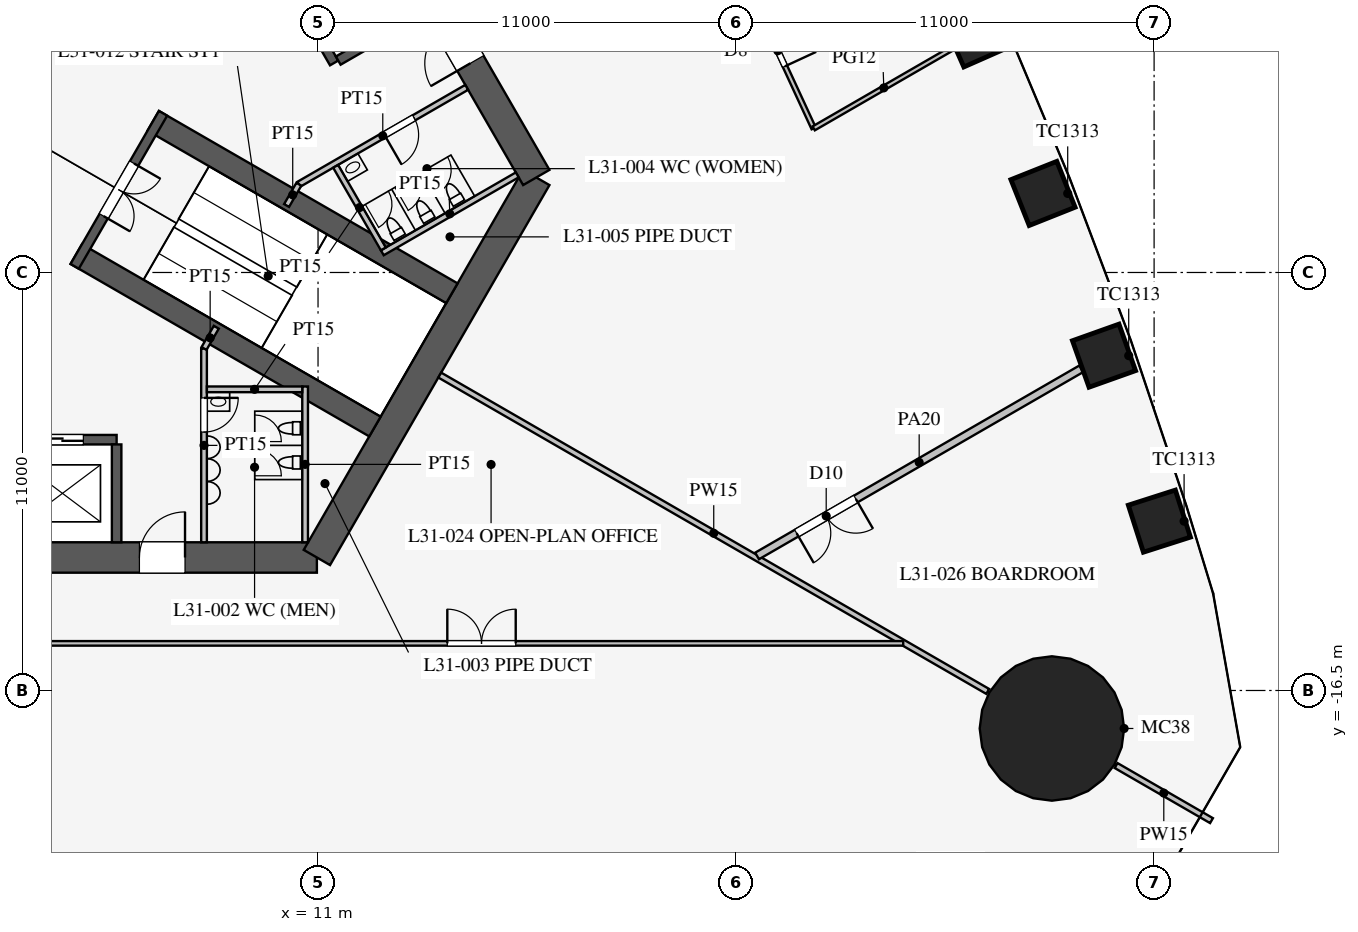
"""IFC4 building model, lengths in metres.
Left out: names, types, materials, properties, quantities, classifications, styles, units other than length and angle.
Written with IfcOpenShell. Run it as: python <this file> out.ifc"""

import sys

from ifc_helpers import new_model, si_unit, direction, frame, frame_2d, origin, origin_2d, place, context, subcontext, project, spatial, rectangle, circle, extrude, element, fill, save


model = new_model("IFC4")
c1 = context("Model", 3, precision=1e-05, world=origin(), true_north=direction((0.0, 1.0)))
c2 = subcontext(c1, "Body", "Model", "MODEL_VIEW")
j1 = project(units=[si_unit("LENGTHUNIT", "METRE"), si_unit("PLANEANGLEUNIT", "RADIAN")], contexts=[c1])
p1 = place(None, origin())
s1 = spatial("IfcSite", under=j1, at=p1, CompositionType="ELEMENT")
p2 = place(p1, origin())
s2 = spatial("IfcBuilding", under=s1, at=p2, CompositionType="ELEMENT")
p3 = place(p2, frame((0.0, 0.0, 136.7)))
s3 = spatial("IfcBuildingStorey", under=s2, at=p3, CompositionType="ELEMENT", Elevation=136.7)
for number, where, z_axis, x_axis in (
    (1, (33.139, -12.044, 0.0), (0.0, 0.0, 1.0), (-0.305, 0.952, 0.0)),
    (2, (31.682, -7.689, 0.0), (0.0, 0.0, 1.0), (-0.336, 0.942, 0.0)),
    (3, (30.077, -3.42, 0.0), (0.0, 0.0, 1.0), (-0.37, 0.929, 0.0)),
    (4, (28.325, 0.765, 0.0), (0.0, 0.0, 1.0), (-0.403, 0.915, 0.0)),
):
    element("IfcColumn", number, at=place(p3, frame(where, z_axis=z_axis, x_axis=x_axis)), inside=s3, PredefinedType="COLUMN", context=c2, shape_type="SweptSolid", body=[
        extrude(rectangle(XDim=1.3, YDim=1.3, at=origin_2d()), origin(), (0.0, 0.0, 1.0), 4.2),
    ])
p4 = place(p3, frame((30.311, -17.5, 0.0), z_axis=(0.0, 0.0, 1.0), x_axis=(1.0, 0.0, 0.0)))
e5 = element("IfcColumn", 5, at=p4, inside=s3, PredefinedType="COLUMN", context=c2, shape_type="SweptSolid", body=[
    extrude(circle(Radius=1.9, at=origin_2d()), origin(), (0.0, 0.0, 1.0), 4.2),
])
p5 = place(p3, frame((-10.97, -13.0, 0.0), z_axis=(0.0, 0.0, 1.0), x_axis=(1.0, 0.0, 0.0)))
e6 = element("IfcWall", 6, at=p5, inside=s3, PredefinedType="SHEAR", context=c2, shape_type="SweptSolid", body=[
    extrude(rectangle(XDim=21.939, YDim=0.8, at=frame_2d((10.97, 0.0))), origin(), (0.0, 0.0, 1.0), 4.2),
])
p6 = place(p5, frame((17.27, 0.0, 0.0)))
e7 = element("IfcOpeningElement", 7, at=p6, cuts=e6, PredefinedType="OPENING", context=c2, shape_type="SweptSolid", body=[
    extrude(rectangle(XDim=1.2, YDim=2.1, at=frame_2d((0.6, 1.05))), frame((0.0, 0.41, 0.0), z_axis=(0.0, -1.0, 0.0), x_axis=(1.0, 0.0, 0.0)), (0.0, 0.0, 1.0), 0.82),
])
p7 = place(p5, frame((3.47, 0.0, 0.0)))
e8 = element("IfcOpeningElement", 8, at=p7, cuts=e6, PredefinedType="OPENING", context=c2, shape_type="SweptSolid", body=[
    extrude(rectangle(XDim=1.2, YDim=2.1, at=frame_2d((0.6, 1.05))), frame((0.0, 0.41, 0.0), z_axis=(0.0, -1.0, 0.0), x_axis=(1.0, 0.0, 0.0)), (0.0, 0.0, 1.0), 0.82),
])
p8 = place(p3, frame((10.97, -13.0, 0.0), z_axis=(0.0, 0.0, 1.0), x_axis=(0.499995765644, 0.866027848477, 0.0)))
e9 = element("IfcWall", 9, at=p8, inside=s3, PredefinedType="SHEAR", context=c2, shape_type="SweptSolid", body=[
    extrude(rectangle(XDim=11.547, YDim=0.8, at=frame_2d((5.773, 0.0))), origin(), (0.0, 0.0, 1.0), 4.2),
])
p9 = place(p3, frame((16.743, -3.0, 0.0), z_axis=(0.0, 0.0, 1.0), x_axis=(-0.500002442456, 0.866023993627, 0.0)))
e10 = element("IfcWall", 10, at=p9, inside=s3, PredefinedType="SHEAR", context=c2, shape_type="SweptSolid", body=[
    extrude(rectangle(XDim=21.939, YDim=0.8, at=frame_2d((10.97, 0.0))), origin(), (0.0, 0.0, 1.0), 4.2),
])
p10 = place(p9, frame((17.27, 0.0, 0.0)))
e11 = element("IfcOpeningElement", 11, at=p10, cuts=e10, PredefinedType="OPENING", context=c2, shape_type="SweptSolid", body=[
    extrude(rectangle(XDim=1.2, YDim=2.1, at=frame_2d((0.6, 1.05))), frame((0.0, 0.41, 0.0), z_axis=(0.0, -1.0, 0.0), x_axis=(1.0, 0.0, 0.0)), (0.0, 0.0, 1.0), 0.82),
])
p11 = place(p9, frame((3.47, 0.0, 0.0)))
e12 = element("IfcOpeningElement", 12, at=p11, cuts=e10, PredefinedType="OPENING", context=c2, shape_type="SweptSolid", body=[
    extrude(rectangle(XDim=1.2, YDim=2.1, at=frame_2d((0.6, 1.05))), frame((0.0, 0.41, 0.0), z_axis=(0.0, -1.0, 0.0), x_axis=(1.0, 0.0, 0.0)), (0.0, 0.0, 1.0), 0.82),
])
p12 = place(p3, frame((-5.7, -9.9, 0.0), z_axis=(0.0, 0.0, 1.0), x_axis=(1.0, 0.0, 0.0)))
e13 = element("IfcWall", 13, at=p12, inside=s3, PredefinedType="SHEAR", context=c2, shape_type="SweptSolid", body=[
    extrude(rectangle(XDim=11.4, YDim=0.25, at=frame_2d((5.7, 0.0))), origin(), (0.0, 0.0, 1.0), 4.2),
])
p13 = place(p12, frame((0.875, 0.0, 0.0)))
e14 = element("IfcOpeningElement", 14, at=p13, cuts=e13, PredefinedType="OPENING", context=c2, shape_type="SweptSolid", body=[
    extrude(rectangle(XDim=1.1, YDim=2.2, at=frame_2d((0.55, 1.1))), frame((0.0, 0.135, 0.0), z_axis=(0.0, -1.0, 0.0), x_axis=(1.0, 0.0, 0.0)), (0.0, 0.0, 1.0), 0.27),
])
p14 = place(p12, frame((3.725, 0.0, 0.0)))
e15 = element("IfcOpeningElement", 15, at=p14, cuts=e13, PredefinedType="OPENING", context=c2, shape_type="SweptSolid", body=[
    extrude(rectangle(XDim=1.1, YDim=2.2, at=frame_2d((0.55, 1.1))), frame((0.0, 0.135, 0.0), z_axis=(0.0, -1.0, 0.0), x_axis=(1.0, 0.0, 0.0)), (0.0, 0.0, 1.0), 0.27),
])
p15 = place(p12, frame((6.575, 0.0, 0.0)))
e16 = element("IfcOpeningElement", 16, at=p15, cuts=e13, PredefinedType="OPENING", context=c2, shape_type="SweptSolid", body=[
    extrude(rectangle(XDim=1.1, YDim=2.2, at=frame_2d((0.55, 1.1))), frame((0.0, 0.135, 0.0), z_axis=(0.0, -1.0, 0.0), x_axis=(1.0, 0.0, 0.0)), (0.0, 0.0, 1.0), 0.27),
])
p16 = place(p12, frame((9.425, 0.0, 0.0)))
e17 = element("IfcOpeningElement", 17, at=p16, cuts=e13, PredefinedType="OPENING", context=c2, shape_type="SweptSolid", body=[
    extrude(rectangle(XDim=1.1, YDim=2.2, at=frame_2d((0.55, 1.1))), frame((0.0, 0.135, 0.0), z_axis=(0.0, -1.0, 0.0), x_axis=(1.0, 0.0, 0.0)), (0.0, 0.0, 1.0), 0.27),
])
p17 = place(p3, frame((5.7, -10.025, 0.0), z_axis=(0.0, 0.0, 1.0), x_axis=(0.0, -1.0, 0.0)))
e18 = element("IfcWall", 18, at=p17, inside=s3, PredefinedType="SHEAR", context=c2, shape_type="SweptSolid", body=[
    extrude(rectangle(XDim=2.575, YDim=0.25, at=frame_2d((1.288, 0.0))), origin(), (0.0, 0.0, 1.0), 4.2),
])
p18 = place(p3, frame((11.424, 0.014, 0.0), z_axis=(0.0, 0.0, 1.0), x_axis=(-0.500001763848, 0.866024385424, 0.0)))
e19 = element("IfcWall", 19, at=p18, inside=s3, PredefinedType="SHEAR", context=c2, shape_type="SweptSolid", body=[
    extrude(rectangle(XDim=11.4, YDim=0.25, at=frame_2d((5.7, 0.0))), origin(), (0.0, 0.0, 1.0), 4.2),
])
p19 = place(p18, frame((0.975, 0.0, 0.0)))
e20 = element("IfcOpeningElement", 20, at=p19, cuts=e19, PredefinedType="OPENING", context=c2, shape_type="SweptSolid", body=[
    extrude(rectangle(XDim=0.9, YDim=2.1, at=frame_2d((0.45, 1.05))), frame((0.0, 0.135, 0.0), z_axis=(0.0, -1.0, 0.0), x_axis=(1.0, 0.0, 0.0)), (0.0, 0.0, 1.0), 0.27),
])
p20 = place(p18, frame((3.825, 0.0, 0.0)))
e21 = element("IfcOpeningElement", 21, at=p20, cuts=e19, PredefinedType="OPENING", context=c2, shape_type="SweptSolid", body=[
    extrude(rectangle(XDim=0.9, YDim=2.1, at=frame_2d((0.45, 1.05))), frame((0.0, 0.135, 0.0), z_axis=(0.0, -1.0, 0.0), x_axis=(1.0, 0.0, 0.0)), (0.0, 0.0, 1.0), 0.27),
])
p21 = place(p3, frame((11.532, 0.076, 0.0), z_axis=(0.0, 0.0, 1.0), x_axis=(0.866005588531, 0.500034319456, 0.0)))
e22 = element("IfcWall", 22, at=p21, inside=s3, PredefinedType="SHEAR", context=c2, shape_type="SweptSolid", body=[
    extrude(rectangle(XDim=2.575, YDim=0.25, at=frame_2d((1.288, 0.0))), origin(), (0.0, 0.0, 1.0), 4.2),
])
for number, where, z_axis, x_axis in (
    (23, (4.638, -5.016, 0.0), (0.0, 0.0, 1.0), (0.866, -0.5, 0.0)),
    (24, (6.663, -1.509, 0.0), (0.0, 0.0, 1.0), (0.866, -0.5, 0.0)),
):
    element("IfcWall", number, at=place(p3, frame(where, z_axis=z_axis, x_axis=x_axis)), inside=s3, PredefinedType="SHEAR", context=c2, shape_type="SweptSolid", body=[
        extrude(rectangle(XDim=9.075, YDim=0.6, at=frame_2d((4.538, 0.0))), origin(), (0.0, 0.0, 1.0), 4.2),
    ])
p22 = place(p3, frame((4.597, -5.339, 0.0), z_axis=(0.0, 0.0, 1.0), x_axis=(0.499984536904, 0.866034331223, 0.0)))
e25 = element("IfcWall", 25, at=p22, inside=s3, PredefinedType="SHEAR", context=c2, shape_type="SweptSolid", body=[
    extrude(rectangle(XDim=4.65, YDim=0.25, at=frame_2d((2.325, 0.0))), origin(), (0.0, 0.0, 1.0), 4.2),
])
p23 = place(p22, frame((1.525, 0.0, 0.0)))
e26 = element("IfcOpeningElement", 26, at=p23, cuts=e25, PredefinedType="OPENING", context=c2, shape_type="SweptSolid", body=[
    extrude(rectangle(XDim=1.6, YDim=2.1, at=frame_2d((0.8, 1.05))), frame((0.0, 0.135, 0.0), z_axis=(0.0, -1.0, 0.0), x_axis=(1.0, 0.0, 0.0)), (0.0, 0.0, 1.0), 0.27),
])
p24 = place(p3, frame((8.0, -7.5, 0.0), z_axis=(0.0, 0.0, 1.0), x_axis=(0.0, -1.0, 0.0)))
e27 = element("IfcWall", 27, at=p24, inside=s3, PredefinedType="PARTITIONING", context=c2, shape_type="SweptSolid", body=[
    extrude(rectangle(XDim=5.1, YDim=0.15, at=frame_2d((2.55, 0.0))), origin(), (0.0, 0.0, 1.0), 4.0),
])
p25 = place(p24, frame((1.3, 0.0, 0.0)))
e28 = element("IfcOpeningElement", 28, at=p25, cuts=e27, PredefinedType="OPENING", context=c2, shape_type="SweptSolid", body=[
    extrude(rectangle(XDim=0.9, YDim=2.1, at=frame_2d((0.45, 1.05))), frame((0.0, 0.085, 0.0), z_axis=(0.0, -1.0, 0.0), x_axis=(1.0, 0.0, 0.0)), (0.0, 0.0, 1.0), 0.17),
])
p26 = place(p3, frame((10.495, -3.178, 0.0), z_axis=(0.0, 0.0, 1.0), x_axis=(0.86602216432, 0.500005610874, 0.0)))
e29 = element("IfcWall", 29, at=p26, inside=s3, PredefinedType="PARTITIONING", context=c2, shape_type="SweptSolid", body=[
    extrude(rectangle(XDim=5.1, YDim=0.15, at=frame_2d((2.55, 0.0))), origin(), (0.0, 0.0, 1.0), 4.0),
])
p27 = place(p26, frame((2.6, 0.0, 0.0)))
e30 = element("IfcOpeningElement", 30, at=p27, cuts=e29, PredefinedType="OPENING", context=c2, shape_type="SweptSolid", body=[
    extrude(rectangle(XDim=0.9, YDim=2.1, at=frame_2d((0.45, 1.05))), frame((0.0, 0.085, 0.0), z_axis=(0.0, -1.0, 0.0), x_axis=(1.0, 0.0, 0.0)), (0.0, 0.0, 1.0), 0.17),
])
for number, where, z_axis, x_axis in (
    (31, (8.0, -7.5, 0.0), (0.0, 0.0, 1.0), (0.5, 0.866, 0.0)),
    (32, (10.495, -3.178, 0.0), (0.0, 0.0, 1.0), (-0.5, -0.866, 0.0)),
):
    element("IfcWall", number, at=place(p3, frame(where, z_axis=z_axis, x_axis=x_axis)), inside=s3, PredefinedType="PARTITIONING", context=c2, shape_type="SweptSolid", body=[
        extrude(rectangle(XDim=0.645, YDim=0.15, at=frame_2d((0.323, 0.0))), origin(), (0.0, 0.0, 1.0), 4.0),
    ])
p28 = place(p3, frame((10.66, -8.5, 0.0), z_axis=(0.0, 0.0, 1.0), x_axis=(0.0, -1.0, 0.0)))
e33 = element("IfcWall", 33, at=p28, inside=s3, PredefinedType="PARTITIONING", context=c2, shape_type="SweptSolid", body=[
    extrude(rectangle(XDim=4.1, YDim=0.15, at=frame_2d((2.05, 0.0))), origin(), (0.0, 0.0, 1.0), 4.0),
])
p29 = place(p3, frame((8.075, -8.575, 0.0), z_axis=(0.0, 0.0, 1.0), x_axis=(1.0, 0.0, 0.0)))
e34 = element("IfcWall", 34, at=p29, inside=s3, PredefinedType="PARTITIONING", context=c2, shape_type="SweptSolid", body=[
    extrude(rectangle(XDim=2.51, YDim=0.15, at=frame_2d((1.255, 0.0))), origin(), (0.0, 0.0, 1.0), 4.0),
])
p30 = place(p3, frame((12.691, -4.982, 0.0), z_axis=(0.0, 0.0, 1.0), x_axis=(0.8660249478, 0.500000789788, 0.0)))
e35 = element("IfcWall", 35, at=p30, inside=s3, PredefinedType="PARTITIONING", context=c2, shape_type="SweptSolid", body=[
    extrude(rectangle(XDim=4.1, YDim=0.15, at=frame_2d((2.05, 0.0))), origin(), (0.0, 0.0, 1.0), 4.0),
])
p31 = place(p3, frame((11.464, -2.706, 0.0), z_axis=(0.0, 0.0, 1.0), x_axis=(0.50001992892, -0.866013897511, 0.0)))
e36 = element("IfcWall", 36, at=p31, inside=s3, PredefinedType="PARTITIONING", context=c2, shape_type="SweptSolid", body=[
    extrude(rectangle(XDim=2.51, YDim=0.15, at=frame_2d((1.255, 0.0))), origin(), (0.0, 0.0, 1.0), 4.0),
])
p32 = place(p3, frame((14.203, -8.2, 0.0), z_axis=(0.0, 0.0, 1.0), x_axis=(0.866024668836, -0.500001272966, 0.0)))
e37 = element("IfcWall", 37, at=p32, inside=s3, PredefinedType="PARTITIONING", context=c2, shape_type="SweptSolid", body=[
    extrude(rectangle(XDim=16.65, YDim=0.15, at=frame_2d((8.325, 0.0))), origin(), (0.0, 0.0, 1.0), 2.3),
])
p33 = place(p3, frame((32.0, -18.475, 0.0), z_axis=(0.0, 0.0, 1.0), x_axis=(0.866042548026, -0.499970304126, 0.0)))
e38 = element("IfcWall", 38, at=p33, inside=s3, PredefinedType="PARTITIONING", context=c2, shape_type="SweptSolid", body=[
    extrude(rectangle(XDim=2.899, YDim=0.15, at=frame_2d((1.45, 0.0))), origin(), (0.0, 0.0, 1.0), 2.3),
])
p34 = place(p3, frame((-26.398, -15.26, 0.0), z_axis=(0.0, 0.0, 1.0), x_axis=(1.0, 0.0, 0.0)))
e39 = element("IfcWall", 39, at=p34, inside=s3, PredefinedType="PARTITIONING", context=c2, shape_type="SweptSolid", body=[
    extrude(rectangle(XDim=52.796, YDim=0.12, at=frame_2d((26.398, 0.0))), origin(), (0.0, 0.0, 1.0), 2.9),
])
p35 = place(p34, frame((10.2, 0.0, 0.15)))
e40 = element("IfcOpeningElement", 40, at=p35, cuts=e39, PredefinedType="OPENING", context=c2, shape_type="SweptSolid", body=[
    extrude(rectangle(XDim=1.8, YDim=2.1, at=frame_2d((0.9, 1.05))), frame((0.0, 0.07, 0.0), z_axis=(0.0, -1.0, 0.0), x_axis=(1.0, 0.0, 0.0)), (0.0, 0.0, 1.0), 0.14),
])
p36 = place(p34, frame((40.8, 0.0, 0.15)))
e41 = element("IfcOpeningElement", 41, at=p36, cuts=e39, PredefinedType="OPENING", context=c2, shape_type="SweptSolid", body=[
    extrude(rectangle(XDim=1.8, YDim=2.1, at=frame_2d((0.9, 1.05))), frame((0.0, 0.07, 0.0), z_axis=(0.0, -1.0, 0.0), x_axis=(1.0, 0.0, 0.0)), (0.0, 0.0, 1.0), 0.14),
])
p37 = place(p3, frame((24.043, -1.708, 0.0), z_axis=(0.0, 0.0, 1.0), x_axis=(-0.41992827805, 0.90755729367, 0.0)))
e42 = element("IfcWall", 42, at=p37, inside=s3, PredefinedType="PARTITIONING", context=c2, shape_type="SweptSolid", body=[
    extrude(rectangle(XDim=4.519, YDim=0.12, at=frame_2d((2.259, 0.0))), origin(), (0.0, 0.0, 1.0), 2.9),
])
p38 = place(p37, frame((1.8, 0.0, 0.15)))
e43 = element("IfcOpeningElement", 43, at=p38, cuts=e42, PredefinedType="OPENING", context=c2, shape_type="SweptSolid", body=[
    extrude(rectangle(XDim=0.9, YDim=2.1, at=frame_2d((0.45, 1.05))), frame((0.0, 0.07, 0.0), z_axis=(0.0, -1.0, 0.0), x_axis=(1.0, 0.0, 0.0)), (0.0, 0.0, 1.0), 0.14),
])
p39 = place(p3, frame((24.043, -1.708, 0.0), z_axis=(0.0, 0.0, 1.0), x_axis=(0.866006218662, 0.500033228135, 0.0)))
e44 = element("IfcWall", 44, at=p39, inside=s3, PredefinedType="PARTITIONING", context=c2, shape_type="SweptSolid", body=[
    extrude(rectangle(XDim=4.261, YDim=0.12, at=frame_2d((2.131, 0.0))), origin(), (0.0, 0.0, 1.0), 2.9),
])
p40 = place(p3, frame((22.553, -12.96, 0.0), z_axis=(0.0, 0.0, 1.0), x_axis=(0.86603204091, 0.499988503985, 0.0)))
e45 = element("IfcWall", 45, at=p40, inside=s3, PredefinedType="PARTITIONING", context=c2, shape_type="SweptSolid", body=[
    extrude(rectangle(XDim=9.85, YDim=0.2, at=frame_2d((4.925, 0.0))), origin(), (0.0, 0.0, 1.0), 2.9),
])
p41 = place(p40, frame((1.2, 0.0, 0.15)))
e46 = element("IfcOpeningElement", 46, at=p41, cuts=e45, PredefinedType="OPENING", context=c2, shape_type="SweptSolid", body=[
    extrude(rectangle(XDim=1.8, YDim=2.1, at=frame_2d((0.9, 1.05))), frame((0.0, 0.11, 0.0), z_axis=(0.0, -1.0, 0.0), x_axis=(1.0, 0.0, 0.0)), (0.0, 0.0, 1.0), 0.22),
])
p42 = place(p25, origin())
e47 = element("IfcDoor", 47, at=p42, inside=s3, OperationType="SINGLE_SWING_LEFT", PredefinedType="DOOR", context=c2, shape_type="SweptSolid", body=[
    extrude(rectangle(XDim=0.9, YDim=2.1, at=frame_2d((0.45, 1.05))), frame((0.0, 0.025, 0.0), z_axis=(0.0, -1.0, 0.0), x_axis=(1.0, 0.0, 0.0)), (0.0, 0.0, 1.0), 0.05),
])
fill(e28, e47)
p43 = place(p27, frame((0.9, 0.0, 0.0), z_axis=(0.0, 0.0, 1.0), x_axis=(-1.0, 0.0, 0.0)))
e48 = element("IfcDoor", 48, at=p43, inside=s3, OperationType="SINGLE_SWING_RIGHT", PredefinedType="DOOR", context=c2, shape_type="SweptSolid", body=[
    extrude(rectangle(XDim=0.9, YDim=2.1, at=frame_2d((0.45, 1.05))), frame((0.0, 0.025, 0.0), z_axis=(0.0, -1.0, 0.0), x_axis=(1.0, 0.0, 0.0)), (0.0, 0.0, 1.0), 0.05),
])
fill(e30, e48)
p44 = place(p23, frame((1.6, 0.0, 0.0), z_axis=(0.0, 0.0, 1.0), x_axis=(-1.0, 0.0, 0.0)))
e49 = element("IfcDoor", 49, at=p44, inside=s3, OperationType="DOUBLE_DOOR_SINGLE_SWING", PredefinedType="DOOR", context=c2, shape_type="SweptSolid", body=[
    extrude(rectangle(XDim=1.6, YDim=2.1, at=frame_2d((0.8, 1.05))), frame((0.0, 0.025, 0.0), z_axis=(0.0, -1.0, 0.0), x_axis=(1.0, 0.0, 0.0)), (0.0, 0.0, 1.0), 0.05),
])
fill(e26, e49)
p45 = place(p6, origin())
e50 = element("IfcDoor", 50, at=p45, inside=s3, OperationType="SINGLE_SWING_RIGHT", PredefinedType="DOOR", context=c2, shape_type="SweptSolid", body=[
    extrude(rectangle(XDim=1.2, YDim=2.1, at=frame_2d((0.6, 1.05))), frame((0.0, 0.025, 0.0), z_axis=(0.0, -1.0, 0.0), x_axis=(1.0, 0.0, 0.0)), (0.0, 0.0, 1.0), 0.05),
])
fill(e7, e50)
p46 = place(p11, origin())
e51 = element("IfcDoor", 51, at=p46, inside=s3, OperationType="SINGLE_SWING_LEFT", PredefinedType="DOOR", context=c2, shape_type="SweptSolid", body=[
    extrude(rectangle(XDim=1.2, YDim=2.1, at=frame_2d((0.6, 1.05))), frame((0.0, 0.025, 0.0), z_axis=(0.0, -1.0, 0.0), x_axis=(1.0, 0.0, 0.0)), (0.0, 0.0, 1.0), 0.05),
])
fill(e12, e51)
p47 = place(p36, origin())
e52 = element("IfcDoor", 52, at=p47, inside=s3, OperationType="DOUBLE_DOOR_SINGLE_SWING", PredefinedType="DOOR", context=c2, shape_type="SweptSolid", body=[
    extrude(rectangle(XDim=1.8, YDim=2.1, at=frame_2d((0.9, 1.05))), frame((0.0, 0.025, 0.0), z_axis=(0.0, -1.0, 0.0), x_axis=(1.0, 0.0, 0.0)), (0.0, 0.0, 1.0), 0.05),
])
fill(e41, e52)
p48 = place(p41, frame((1.8, 0.0, 0.0), z_axis=(0.0, 0.0, 1.0), x_axis=(-1.0, 0.0, 0.0)))
e53 = element("IfcDoor", 53, at=p48, inside=s3, OperationType="DOUBLE_DOOR_SINGLE_SWING", PredefinedType="DOOR", context=c2, shape_type="SweptSolid", body=[
    extrude(rectangle(XDim=1.8, YDim=2.1, at=frame_2d((0.9, 1.05))), frame((0.0, 0.025, 0.0), z_axis=(0.0, -1.0, 0.0), x_axis=(1.0, 0.0, 0.0)), (0.0, 0.0, 1.0), 0.05),
])
fill(e46, e53)
p49 = place(p38, frame((0.9, 0.0, 0.0), z_axis=(0.0, 0.0, 1.0), x_axis=(-1.0, 0.0, 0.0)))
e54 = element("IfcDoor", 54, at=p49, inside=s3, OperationType="SINGLE_SWING_RIGHT", PredefinedType="DOOR", context=c2, shape_type="SweptSolid", body=[
    extrude(rectangle(XDim=0.9, YDim=2.1, at=frame_2d((0.45, 1.05))), frame((0.0, 0.025, 0.0), z_axis=(0.0, -1.0, 0.0), x_axis=(1.0, 0.0, 0.0)), (0.0, 0.0, 1.0), 0.05),
])
fill(e43, e54)
p50 = place(p16, origin())
e55 = element("IfcDoor", 55, at=p50, inside=s3, OperationType="DOUBLE_DOOR_SLIDING", PredefinedType="DOOR", context=c2, shape_type="SweptSolid", body=[
    extrude(rectangle(XDim=1.1, YDim=2.2, at=frame_2d((0.55, 1.1))), frame((0.0, 0.025, 0.0), z_axis=(0.0, -1.0, 0.0), x_axis=(1.0, 0.0, 0.0)), (0.0, 0.0, 1.0), 0.05),
])
fill(e17, e55)
save(model, sys.argv[1])
